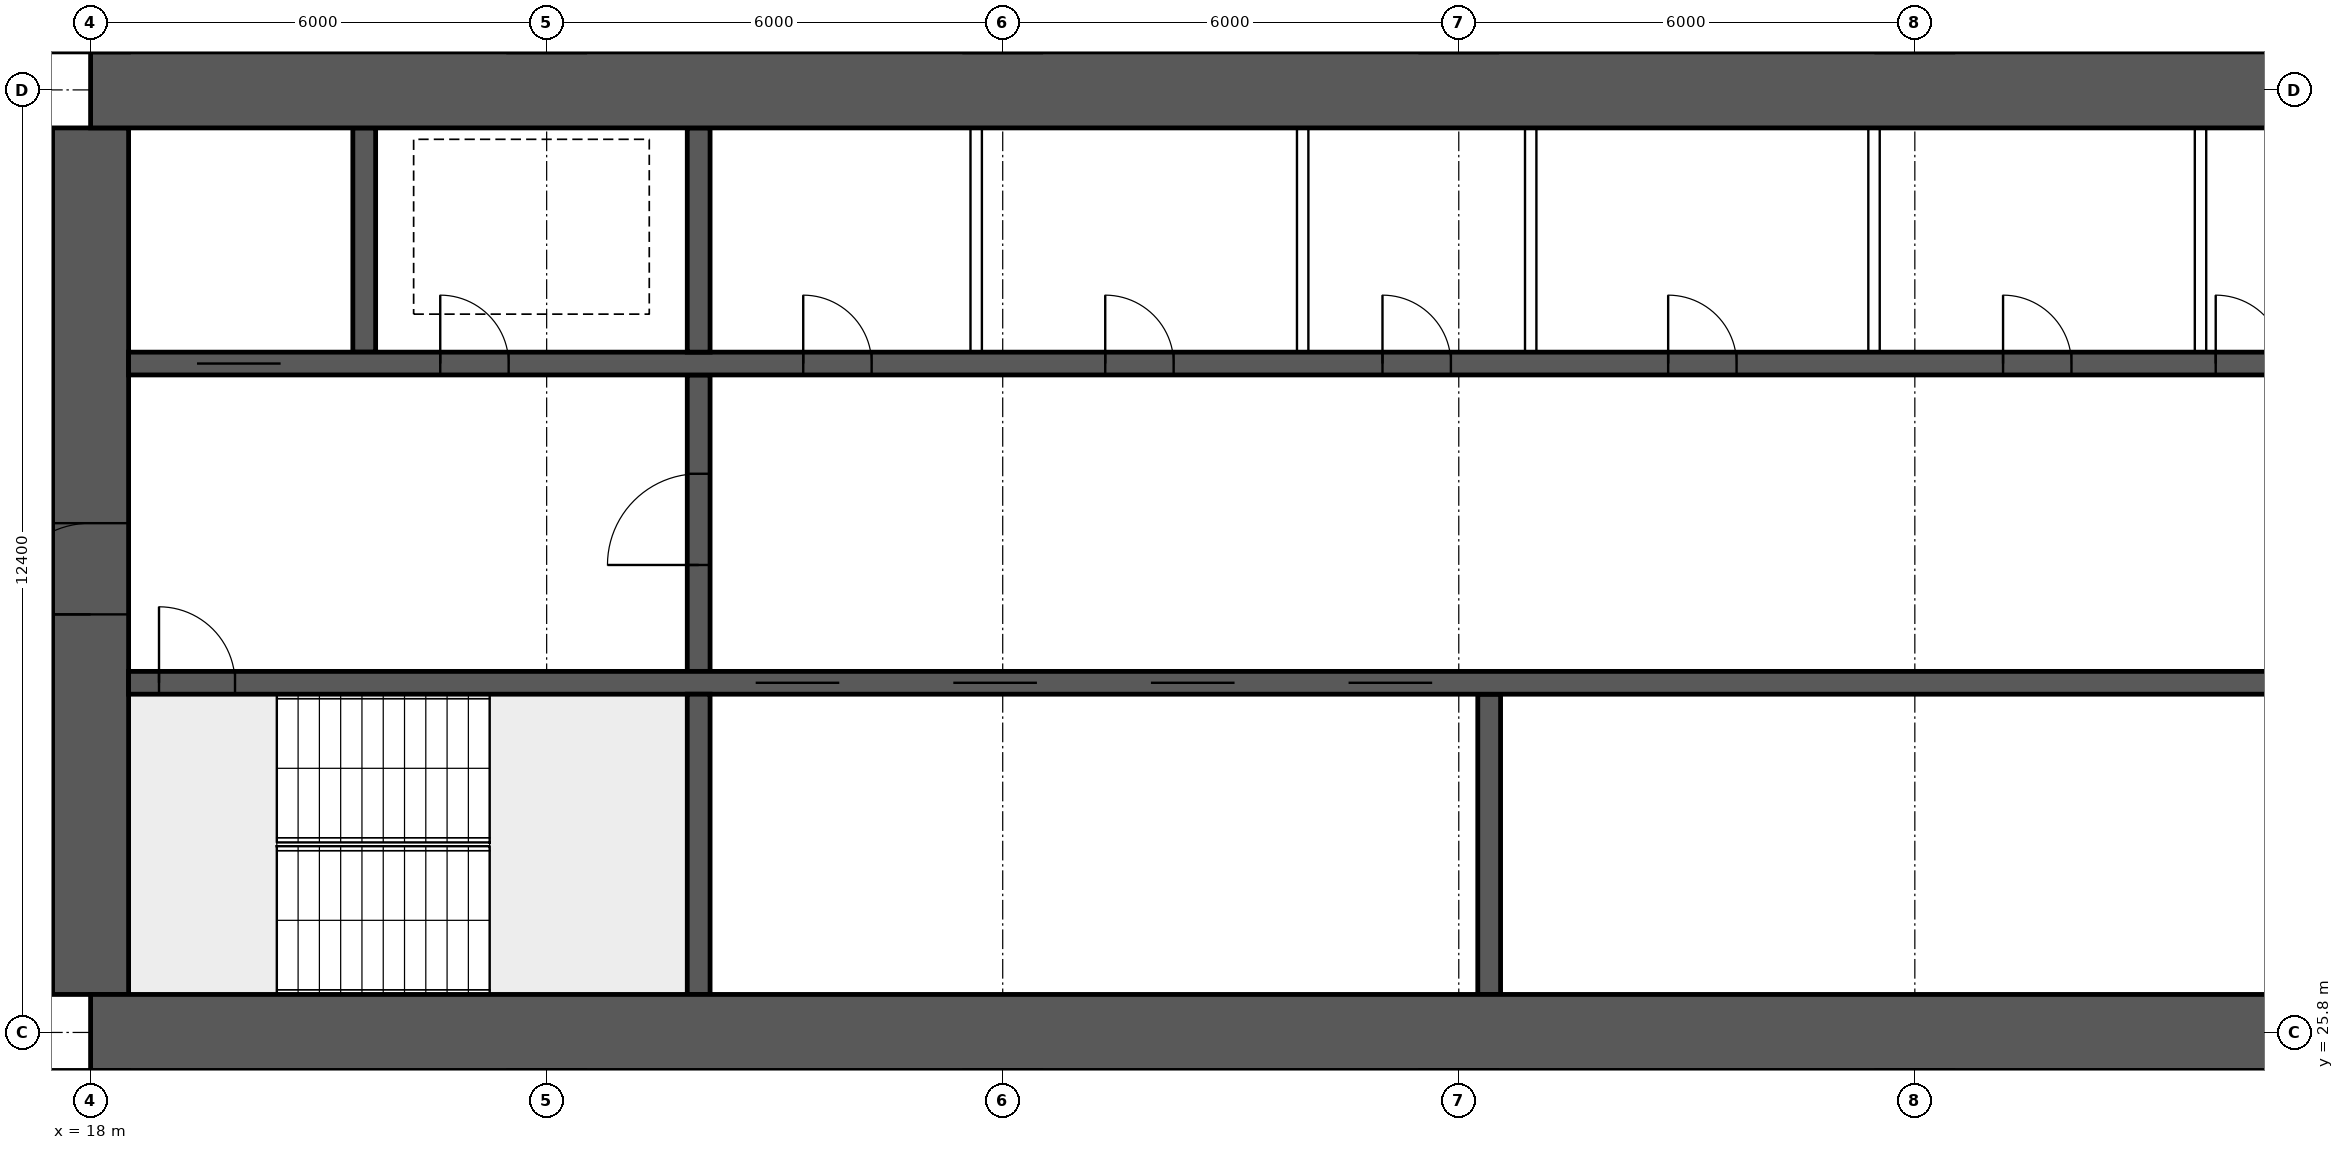
"""IFC4 building model, lengths in metres.
Left out: names, types, materials, properties, quantities, classifications, styles, units other than length and angle.
Written with IfcOpenShell. Run it as: python <this file> out.ifc"""

import sys

from ifc_helpers import new_model, si_unit, direction, frame, frame_2d, origin, place, context, subcontext, project, spatial, rectangle, extrude, element, fill, save


model = new_model("IFC4")
c1 = context("Model", 3, precision=1e-05, world=origin(), true_north=direction((0.0, 1.0)))
c2 = subcontext(c1, "Body", "Model", "MODEL_VIEW")
j1 = project(units=[si_unit("LENGTHUNIT", "METRE"), si_unit("PLANEANGLEUNIT", "RADIAN")], contexts=[c1])
p1 = place(None, origin())
s1 = spatial("IfcSite", under=j1, at=p1, CompositionType="ELEMENT")
p2 = place(p1, origin())
s2 = spatial("IfcBuilding", under=s1, at=p2, CompositionType="ELEMENT")
p3 = place(p2, frame((0.0, 0.0, 61.45)))
s3 = spatial("IfcBuildingStorey", under=s2, at=p3, CompositionType="ELEMENT", Elevation=61.45)
for number, where, z_axis, x_axis in (
    (1, (18.0, 25.8, 0.0), (0.0, 0.0, 1.0), (1.0, 0.0, 0.0)),
    (2, (18.0, 38.2, 0.0), (0.0, 0.0, 1.0), (1.0, 0.0, 0.0)),
):
    element("IfcWall", number, at=place(p3, frame(where, z_axis=z_axis, x_axis=x_axis)), inside=s3, PredefinedType="SHEAR", context=c2, shape_type="SweptSolid", body=[
        extrude(rectangle(XDim=48.0, YDim=1.0, at=frame_2d((24.0, 0.0))), origin(), (0.0, 0.0, 1.0), 3.75),
    ])
p4 = place(p3, frame((18.0, 26.3, 0.0), z_axis=(0.0, 0.0, 1.0), x_axis=(0.0, 1.0, 0.0)))
e3 = element("IfcWall", 3, at=p4, inside=s3, PredefinedType="SHEAR", context=c2, shape_type="SweptSolid", body=[
    extrude(rectangle(XDim=11.4, YDim=1.0, at=frame_2d((5.7, 0.0))), origin(), (0.0, 0.0, 1.0), 3.75),
])
p5 = place(p4, frame((5.0, 0.0, 0.0)))
e4 = element("IfcOpeningElement", 4, at=p5, cuts=e3, PredefinedType="OPENING", context=c2, shape_type="SweptSolid", body=[
    extrude(rectangle(XDim=1.2, YDim=2.1, at=frame_2d((0.6, 1.05))), frame((0.0, 0.51, 0.0), z_axis=(0.0, -1.0, 0.0), x_axis=(1.0, 0.0, 0.0)), (0.0, 0.0, 1.0), 1.02),
])
p6 = place(p3, frame((18.5, 30.4, 0.0), z_axis=(0.0, 0.0, 1.0), x_axis=(1.0, 0.0, 0.0)))
e5 = element("IfcWall", 5, at=p6, inside=s3, PredefinedType="SHEAR", context=c2, shape_type="SweptSolid", body=[
    extrude(rectangle(XDim=47.0, YDim=0.3, at=frame_2d((23.5, 0.0))), origin(), (0.0, 0.0, 1.0), 3.75),
])
p7 = place(p6, frame((0.4, 0.0, 0.0)))
e6 = element("IfcOpeningElement", 6, at=p7, cuts=e5, PredefinedType="OPENING", context=c2, shape_type="SweptSolid", body=[
    extrude(rectangle(XDim=1.0, YDim=2.1, at=frame_2d((0.5, 1.05))), frame((0.0, 0.16, 0.0), z_axis=(0.0, -1.0, 0.0), x_axis=(1.0, 0.0, 0.0)), (0.0, 0.0, 1.0), 0.32),
])
p8 = place(p6, frame((45.6, 0.0, 0.0)))
e7 = element("IfcOpeningElement", 7, at=p8, cuts=e5, PredefinedType="OPENING", context=c2, shape_type="SweptSolid", body=[
    extrude(rectangle(XDim=1.0, YDim=2.1, at=frame_2d((0.5, 1.05))), frame((0.0, 0.16, 0.0), z_axis=(0.0, -1.0, 0.0), x_axis=(1.0, 0.0, 0.0)), (0.0, 0.0, 1.0), 0.32),
])
p9 = place(p6, frame((8.25, 0.0, 0.0)))
e8 = element("IfcOpeningElement", 8, at=p9, cuts=e5, PredefinedType="OPENING", context=c2, shape_type="SweptSolid", body=[
    extrude(rectangle(XDim=1.1, YDim=2.1, at=frame_2d((0.55, 1.05))), frame((0.0, 0.16, 0.0), z_axis=(0.0, -1.0, 0.0), x_axis=(1.0, 0.0, 0.0)), (0.0, 0.0, 1.0), 0.32),
])
p10 = place(p6, frame((10.85, 0.0, 0.0)))
e9 = element("IfcOpeningElement", 9, at=p10, cuts=e5, PredefinedType="OPENING", context=c2, shape_type="SweptSolid", body=[
    extrude(rectangle(XDim=1.1, YDim=2.1, at=frame_2d((0.55, 1.05))), frame((0.0, 0.16, 0.0), z_axis=(0.0, -1.0, 0.0), x_axis=(1.0, 0.0, 0.0)), (0.0, 0.0, 1.0), 0.32),
])
p11 = place(p6, frame((13.45, 0.0, 0.0)))
e10 = element("IfcOpeningElement", 10, at=p11, cuts=e5, PredefinedType="OPENING", context=c2, shape_type="SweptSolid", body=[
    extrude(rectangle(XDim=1.1, YDim=2.1, at=frame_2d((0.55, 1.05))), frame((0.0, 0.16, 0.0), z_axis=(0.0, -1.0, 0.0), x_axis=(1.0, 0.0, 0.0)), (0.0, 0.0, 1.0), 0.32),
])
p12 = place(p6, frame((16.05, 0.0, 0.0)))
e11 = element("IfcOpeningElement", 11, at=p12, cuts=e5, PredefinedType="OPENING", context=c2, shape_type="SweptSolid", body=[
    extrude(rectangle(XDim=1.1, YDim=2.1, at=frame_2d((0.55, 1.05))), frame((0.0, 0.16, 0.0), z_axis=(0.0, -1.0, 0.0), x_axis=(1.0, 0.0, 0.0)), (0.0, 0.0, 1.0), 0.32),
])
p13 = place(p6, frame((30.117, 0.0, 0.0)))
e12 = element("IfcOpeningElement", 12, at=p13, cuts=e5, PredefinedType="OPENING", context=c2, shape_type="SweptSolid", body=[
    extrude(rectangle(XDim=1.1, YDim=2.1, at=frame_2d((0.55, 1.05))), frame((0.0, 0.16, 0.0), z_axis=(0.0, -1.0, 0.0), x_axis=(1.0, 0.0, 0.0)), (0.0, 0.0, 1.0), 0.32),
])
p14 = place(p6, frame((33.65, 0.0, 0.0)))
e13 = element("IfcOpeningElement", 13, at=p14, cuts=e5, PredefinedType="OPENING", context=c2, shape_type="SweptSolid", body=[
    extrude(rectangle(XDim=1.1, YDim=2.1, at=frame_2d((0.55, 1.05))), frame((0.0, 0.16, 0.0), z_axis=(0.0, -1.0, 0.0), x_axis=(1.0, 0.0, 0.0)), (0.0, 0.0, 1.0), 0.32),
])
p15 = place(p6, frame((37.183, 0.0, 0.0)))
e14 = element("IfcOpeningElement", 14, at=p15, cuts=e5, PredefinedType="OPENING", context=c2, shape_type="SweptSolid", body=[
    extrude(rectangle(XDim=1.1, YDim=2.1, at=frame_2d((0.55, 1.05))), frame((0.0, 0.16, 0.0), z_axis=(0.0, -1.0, 0.0), x_axis=(1.0, 0.0, 0.0)), (0.0, 0.0, 1.0), 0.32),
])
p16 = place(p3, frame((18.5, 34.6, 0.0), z_axis=(0.0, 0.0, 1.0), x_axis=(1.0, 0.0, 0.0)))
e15 = element("IfcWall", 15, at=p16, inside=s3, PredefinedType="SHEAR", context=c2, shape_type="SweptSolid", body=[
    extrude(rectangle(XDim=47.0, YDim=0.3, at=frame_2d((23.5, 0.0))), origin(), (0.0, 0.0, 1.0), 3.75),
])
p17 = place(p16, frame((0.9, 0.0, 0.0)))
e16 = element("IfcOpeningElement", 16, at=p17, cuts=e15, PredefinedType="OPENING", context=c2, shape_type="SweptSolid", body=[
    extrude(rectangle(XDim=1.1, YDim=2.1, at=frame_2d((0.55, 1.05))), frame((0.0, 0.16, 0.0), z_axis=(0.0, -1.0, 0.0), x_axis=(1.0, 0.0, 0.0)), (0.0, 0.0, 1.0), 0.32),
])
p18 = place(p16, frame((45.0, 0.0, 0.0)))
e17 = element("IfcOpeningElement", 17, at=p18, cuts=e15, PredefinedType="OPENING", context=c2, shape_type="SweptSolid", body=[
    extrude(rectangle(XDim=1.1, YDim=2.1, at=frame_2d((0.55, 1.05))), frame((0.0, 0.16, 0.0), z_axis=(0.0, -1.0, 0.0), x_axis=(1.0, 0.0, 0.0)), (0.0, 0.0, 1.0), 0.32),
])
p19 = place(p16, frame((4.1, 0.0, 0.0)))
e18 = element("IfcOpeningElement", 18, at=p19, cuts=e15, PredefinedType="OPENING", context=c2, shape_type="SweptSolid", body=[
    extrude(rectangle(XDim=0.9, YDim=2.1, at=frame_2d((0.45, 1.05))), frame((0.0, 0.16, 0.0), z_axis=(0.0, -1.0, 0.0), x_axis=(1.0, 0.0, 0.0)), (0.0, 0.0, 1.0), 0.32),
])
p20 = place(p16, frame((42.0, 0.0, 0.0)))
e19 = element("IfcOpeningElement", 19, at=p20, cuts=e15, PredefinedType="OPENING", context=c2, shape_type="SweptSolid", body=[
    extrude(rectangle(XDim=0.9, YDim=2.1, at=frame_2d((0.45, 1.05))), frame((0.0, 0.16, 0.0), z_axis=(0.0, -1.0, 0.0), x_axis=(1.0, 0.0, 0.0)), (0.0, 0.0, 1.0), 0.32),
])
p21 = place(p16, frame((8.875, 0.0, 0.0)))
e20 = element("IfcOpeningElement", 20, at=p21, cuts=e15, PredefinedType="OPENING", context=c2, shape_type="SweptSolid", body=[
    extrude(rectangle(XDim=0.9, YDim=2.1, at=frame_2d((0.45, 1.05))), frame((0.0, 0.16, 0.0), z_axis=(0.0, -1.0, 0.0), x_axis=(1.0, 0.0, 0.0)), (0.0, 0.0, 1.0), 0.32),
])
p22 = place(p16, frame((12.849, 0.0, 0.0)))
e21 = element("IfcOpeningElement", 21, at=p22, cuts=e15, PredefinedType="OPENING", context=c2, shape_type="SweptSolid", body=[
    extrude(rectangle(XDim=0.9, YDim=2.1, at=frame_2d((0.45, 1.05))), frame((0.0, 0.16, 0.0), z_axis=(0.0, -1.0, 0.0), x_axis=(1.0, 0.0, 0.0)), (0.0, 0.0, 1.0), 0.32),
])
p23 = place(p16, frame((16.496, 0.0, 0.0)))
e22 = element("IfcOpeningElement", 22, at=p23, cuts=e15, PredefinedType="OPENING", context=c2, shape_type="SweptSolid", body=[
    extrude(rectangle(XDim=0.9, YDim=2.1, at=frame_2d((0.45, 1.05))), frame((0.0, 0.16, 0.0), z_axis=(0.0, -1.0, 0.0), x_axis=(1.0, 0.0, 0.0)), (0.0, 0.0, 1.0), 0.32),
])
p24 = place(p16, frame((20.255, 0.0, 0.0)))
e23 = element("IfcOpeningElement", 23, at=p24, cuts=e15, PredefinedType="OPENING", context=c2, shape_type="SweptSolid", body=[
    extrude(rectangle(XDim=0.9, YDim=2.1, at=frame_2d((0.45, 1.05))), frame((0.0, 0.16, 0.0), z_axis=(0.0, -1.0, 0.0), x_axis=(1.0, 0.0, 0.0)), (0.0, 0.0, 1.0), 0.32),
])
p25 = place(p16, frame((24.661, 0.0, 0.0)))
e24 = element("IfcOpeningElement", 24, at=p25, cuts=e15, PredefinedType="OPENING", context=c2, shape_type="SweptSolid", body=[
    extrude(rectangle(XDim=0.9, YDim=2.1, at=frame_2d((0.45, 1.05))), frame((0.0, 0.16, 0.0), z_axis=(0.0, -1.0, 0.0), x_axis=(1.0, 0.0, 0.0)), (0.0, 0.0, 1.0), 0.32),
])
p26 = place(p16, frame((27.458, 0.0, 0.0)))
e25 = element("IfcOpeningElement", 25, at=p26, cuts=e15, PredefinedType="OPENING", context=c2, shape_type="SweptSolid", body=[
    extrude(rectangle(XDim=0.9, YDim=2.1, at=frame_2d((0.45, 1.05))), frame((0.0, 0.16, 0.0), z_axis=(0.0, -1.0, 0.0), x_axis=(1.0, 0.0, 0.0)), (0.0, 0.0, 1.0), 0.32),
])
p27 = place(p16, frame((29.831, 0.0, 0.0)))
e26 = element("IfcOpeningElement", 26, at=p27, cuts=e15, PredefinedType="OPENING", context=c2, shape_type="SweptSolid", body=[
    extrude(rectangle(XDim=0.9, YDim=2.1, at=frame_2d((0.45, 1.05))), frame((0.0, 0.16, 0.0), z_axis=(0.0, -1.0, 0.0), x_axis=(1.0, 0.0, 0.0)), (0.0, 0.0, 1.0), 0.32),
])
p28 = place(p16, frame((35.302, 0.0, 0.0)))
e27 = element("IfcOpeningElement", 27, at=p28, cuts=e15, PredefinedType="OPENING", context=c2, shape_type="SweptSolid", body=[
    extrude(rectangle(XDim=0.9, YDim=2.1, at=frame_2d((0.45, 1.05))), frame((0.0, 0.16, 0.0), z_axis=(0.0, -1.0, 0.0), x_axis=(1.0, 0.0, 0.0)), (0.0, 0.0, 1.0), 0.32),
])
p29 = place(p3, frame((26.0, 26.3, 0.0), z_axis=(0.0, 0.0, 1.0), x_axis=(0.0, 1.0, 0.0)))
e28 = element("IfcWall", 28, at=p29, inside=s3, PredefinedType="SHEAR", context=c2, shape_type="SweptSolid", body=[
    extrude(rectangle(XDim=3.95, YDim=0.3, at=frame_2d((1.975, 0.0))), origin(), (0.0, 0.0, 1.0), 3.75),
])
p30 = place(p3, frame((26.0, 30.55, 0.0), z_axis=(0.0, 0.0, 1.0), x_axis=(0.0, 1.0, 0.0)))
e29 = element("IfcWall", 29, at=p30, inside=s3, PredefinedType="SHEAR", context=c2, shape_type="SweptSolid", body=[
    extrude(rectangle(XDim=3.9, YDim=0.3, at=frame_2d((1.95, 0.0))), origin(), (0.0, 0.0, 1.0), 3.75),
])
p31 = place(p30, frame((1.4, 0.0, 0.0)))
e30 = element("IfcOpeningElement", 30, at=p31, cuts=e29, PredefinedType="OPENING", context=c2, shape_type="SweptSolid", body=[
    extrude(rectangle(XDim=1.2, YDim=2.1, at=frame_2d((0.6, 1.05))), frame((0.0, 0.16, 0.0), z_axis=(0.0, -1.0, 0.0), x_axis=(1.0, 0.0, 0.0)), (0.0, 0.0, 1.0), 0.32),
])
for number, where, z_axis, x_axis in (
    (31, (21.6, 34.75, 0.0), (0.0, 0.0, 1.0), (0.0, 1.0, 0.0)),
    (32, (26.0, 34.75, 0.0), (0.0, 0.0, 1.0), (0.0, 1.0, 0.0)),
):
    element("IfcWall", number, at=place(p3, frame(where, z_axis=z_axis, x_axis=x_axis)), inside=s3, PredefinedType="SHEAR", context=c2, shape_type="SweptSolid", body=[
        extrude(rectangle(XDim=2.95, YDim=0.3, at=frame_2d((1.475, 0.0))), origin(), (0.0, 0.0, 1.0), 3.75),
    ])
p32 = place(p3, frame((36.4, 26.3, 0.0), z_axis=(0.0, 0.0, 1.0), x_axis=(0.0, 1.0, 0.0)))
e33 = element("IfcWall", 33, at=p32, inside=s3, PredefinedType="SHEAR", context=c2, shape_type="SweptSolid", body=[
    extrude(rectangle(XDim=3.95, YDim=0.3, at=frame_2d((1.975, 0.0))), origin(), (0.0, 0.0, 1.0), 3.75),
])
for number, where, z_axis, x_axis in (
    (34, (29.651, 34.75, 0.0), (0.0, 0.0, 1.0), (0.0, 1.0, 0.0)),
    (35, (33.946, 34.75, 0.0), (0.0, 0.0, 1.0), (0.0, 1.0, 0.0)),
    (36, (36.946, 34.75, 0.0), (0.0, 0.0, 1.0), (0.0, 1.0, 0.0)),
    (37, (41.463, 34.75, 0.0), (0.0, 0.0, 1.0), (0.0, 1.0, 0.0)),
    (38, (45.758, 34.75, 0.0), (0.0, 0.0, 1.0), (0.0, 1.0, 0.0)),
):
    element("IfcWall", number, at=place(p3, frame(where, z_axis=z_axis, x_axis=x_axis)), inside=s3, PredefinedType="SOLIDWALL", context=c2, shape_type="SweptSolid", body=[
        extrude(rectangle(XDim=2.95, YDim=0.15, at=frame_2d((1.475, 0.0))), origin(), (0.0, 0.0, 1.0), 3.5),
    ])
for number, where, z_axis, x_axis in (
    (39, (21.725, 14.9, 0.0), (0.0, 0.0, 1.0), (0.0, 1.0, 0.0)),
    (40, (45.595, 14.9, 0.0), (0.0, 0.0, 1.0), (0.0, 1.0, 0.0)),
):
    element("IfcWall", number, at=place(p3, frame(where, z_axis=z_axis, x_axis=x_axis)), inside=s3, PredefinedType="PARTITIONING", context=c2, shape_type="SweptSolid", body=[
        extrude(rectangle(XDim=10.4, YDim=0.15, at=frame_2d((5.2, 0.0))), origin(), (0.0, 0.0, 1.0), 3.5),
    ])
p33 = place(p5, origin())
e41 = element("IfcDoor", 41, at=p33, inside=s3, OperationType="SINGLE_SWING_LEFT", PredefinedType="DOOR", context=c2, shape_type="SweptSolid", body=[
    extrude(rectangle(XDim=1.2, YDim=2.1, at=frame_2d((0.6, 1.05))), frame((0.0, 0.025, 0.0), z_axis=(0.0, -1.0, 0.0), x_axis=(1.0, 0.0, 0.0)), (0.0, 0.0, 1.0), 0.05),
])
fill(e4, e41)
p34 = place(p7, origin())
e42 = element("IfcDoor", 42, at=p34, inside=s3, OperationType="SINGLE_SWING_LEFT", PredefinedType="DOOR", context=c2, shape_type="SweptSolid", body=[
    extrude(rectangle(XDim=1.0, YDim=2.1, at=frame_2d((0.5, 1.05))), frame((0.0, 0.025, 0.0), z_axis=(0.0, -1.0, 0.0), x_axis=(1.0, 0.0, 0.0)), (0.0, 0.0, 1.0), 0.05),
])
fill(e6, e42)
p35 = place(p17, origin())
e43 = element("IfcDoor", 43, at=p35, inside=s3, OperationType="DOUBLE_DOOR_SLIDING", PredefinedType="DOOR", context=c2, shape_type="SweptSolid", body=[
    extrude(rectangle(XDim=1.1, YDim=2.1, at=frame_2d((0.55, 1.05))), frame((0.0, 0.025, 0.0), z_axis=(0.0, -1.0, 0.0), x_axis=(1.0, 0.0, 0.0)), (0.0, 0.0, 1.0), 0.05),
])
fill(e16, e43)
p36 = place(p19, origin())
e44 = element("IfcDoor", 44, at=p36, inside=s3, OperationType="SINGLE_SWING_LEFT", PredefinedType="DOOR", context=c2, shape_type="SweptSolid", body=[
    extrude(rectangle(XDim=0.9, YDim=2.1, at=frame_2d((0.45, 1.05))), frame((0.0, 0.025, 0.0), z_axis=(0.0, -1.0, 0.0), x_axis=(1.0, 0.0, 0.0)), (0.0, 0.0, 1.0), 0.05),
])
fill(e18, e44)
p37 = place(p31, origin())
e45 = element("IfcDoor", 45, at=p37, inside=s3, OperationType="SINGLE_SWING_LEFT", PredefinedType="DOOR", context=c2, shape_type="SweptSolid", body=[
    extrude(rectangle(XDim=1.2, YDim=2.1, at=frame_2d((0.6, 1.05))), frame((0.0, 0.025, 0.0), z_axis=(0.0, -1.0, 0.0), x_axis=(1.0, 0.0, 0.0)), (0.0, 0.0, 1.0), 0.05),
])
fill(e30, e45)
p38 = place(p21, origin())
e46 = element("IfcDoor", 46, at=p38, inside=s3, OperationType="SINGLE_SWING_LEFT", PredefinedType="DOOR", context=c2, shape_type="SweptSolid", body=[
    extrude(rectangle(XDim=0.9, YDim=2.1, at=frame_2d((0.45, 1.05))), frame((0.0, 0.025, 0.0), z_axis=(0.0, -1.0, 0.0), x_axis=(1.0, 0.0, 0.0)), (0.0, 0.0, 1.0), 0.05),
])
fill(e20, e46)
p39 = place(p22, origin())
e47 = element("IfcDoor", 47, at=p39, inside=s3, OperationType="SINGLE_SWING_LEFT", PredefinedType="DOOR", context=c2, shape_type="SweptSolid", body=[
    extrude(rectangle(XDim=0.9, YDim=2.1, at=frame_2d((0.45, 1.05))), frame((0.0, 0.025, 0.0), z_axis=(0.0, -1.0, 0.0), x_axis=(1.0, 0.0, 0.0)), (0.0, 0.0, 1.0), 0.05),
])
fill(e21, e47)
p40 = place(p23, origin())
e48 = element("IfcDoor", 48, at=p40, inside=s3, OperationType="SINGLE_SWING_LEFT", PredefinedType="DOOR", context=c2, shape_type="SweptSolid", body=[
    extrude(rectangle(XDim=0.9, YDim=2.1, at=frame_2d((0.45, 1.05))), frame((0.0, 0.025, 0.0), z_axis=(0.0, -1.0, 0.0), x_axis=(1.0, 0.0, 0.0)), (0.0, 0.0, 1.0), 0.05),
])
fill(e22, e48)
p41 = place(p24, origin())
e49 = element("IfcDoor", 49, at=p41, inside=s3, OperationType="SINGLE_SWING_LEFT", PredefinedType="DOOR", context=c2, shape_type="SweptSolid", body=[
    extrude(rectangle(XDim=0.9, YDim=2.1, at=frame_2d((0.45, 1.05))), frame((0.0, 0.025, 0.0), z_axis=(0.0, -1.0, 0.0), x_axis=(1.0, 0.0, 0.0)), (0.0, 0.0, 1.0), 0.05),
])
fill(e23, e49)
p42 = place(p25, origin())
e50 = element("IfcDoor", 50, at=p42, inside=s3, OperationType="SINGLE_SWING_LEFT", PredefinedType="DOOR", context=c2, shape_type="SweptSolid", body=[
    extrude(rectangle(XDim=0.9, YDim=2.1, at=frame_2d((0.45, 1.05))), frame((0.0, 0.025, 0.0), z_axis=(0.0, -1.0, 0.0), x_axis=(1.0, 0.0, 0.0)), (0.0, 0.0, 1.0), 0.05),
])
fill(e24, e50)
p43 = place(p26, origin())
e51 = element("IfcDoor", 51, at=p43, inside=s3, OperationType="SINGLE_SWING_LEFT", PredefinedType="DOOR", context=c2, shape_type="SweptSolid", body=[
    extrude(rectangle(XDim=0.9, YDim=2.1, at=frame_2d((0.45, 1.05))), frame((0.0, 0.025, 0.0), z_axis=(0.0, -1.0, 0.0), x_axis=(1.0, 0.0, 0.0)), (0.0, 0.0, 1.0), 0.05),
])
fill(e25, e51)
p44 = place(p9, origin())
e52 = element("IfcDoor", 52, at=p44, inside=s3, OperationType="DOUBLE_DOOR_SLIDING", PredefinedType="DOOR", context=c2, shape_type="SweptSolid", body=[
    extrude(rectangle(XDim=1.1, YDim=2.1, at=frame_2d((0.55, 1.05))), frame((0.0, 0.025, 0.0), z_axis=(0.0, -1.0, 0.0), x_axis=(1.0, 0.0, 0.0)), (0.0, 0.0, 1.0), 0.05),
])
fill(e8, e52)
p45 = place(p10, origin())
e53 = element("IfcDoor", 53, at=p45, inside=s3, OperationType="DOUBLE_DOOR_SLIDING", PredefinedType="DOOR", context=c2, shape_type="SweptSolid", body=[
    extrude(rectangle(XDim=1.1, YDim=2.1, at=frame_2d((0.55, 1.05))), frame((0.0, 0.025, 0.0), z_axis=(0.0, -1.0, 0.0), x_axis=(1.0, 0.0, 0.0)), (0.0, 0.0, 1.0), 0.05),
])
fill(e9, e53)
p46 = place(p11, origin())
e54 = element("IfcDoor", 54, at=p46, inside=s3, OperationType="DOUBLE_DOOR_SLIDING", PredefinedType="DOOR", context=c2, shape_type="SweptSolid", body=[
    extrude(rectangle(XDim=1.1, YDim=2.1, at=frame_2d((0.55, 1.05))), frame((0.0, 0.025, 0.0), z_axis=(0.0, -1.0, 0.0), x_axis=(1.0, 0.0, 0.0)), (0.0, 0.0, 1.0), 0.05),
])
fill(e10, e54)
p47 = place(p12, origin())
e55 = element("IfcDoor", 55, at=p47, inside=s3, OperationType="DOUBLE_DOOR_SLIDING", PredefinedType="DOOR", context=c2, shape_type="SweptSolid", body=[
    extrude(rectangle(XDim=1.1, YDim=2.1, at=frame_2d((0.55, 1.05))), frame((0.0, 0.025, 0.0), z_axis=(0.0, -1.0, 0.0), x_axis=(1.0, 0.0, 0.0)), (0.0, 0.0, 1.0), 0.05),
])
fill(e11, e55)
save(model, sys.argv[1])
